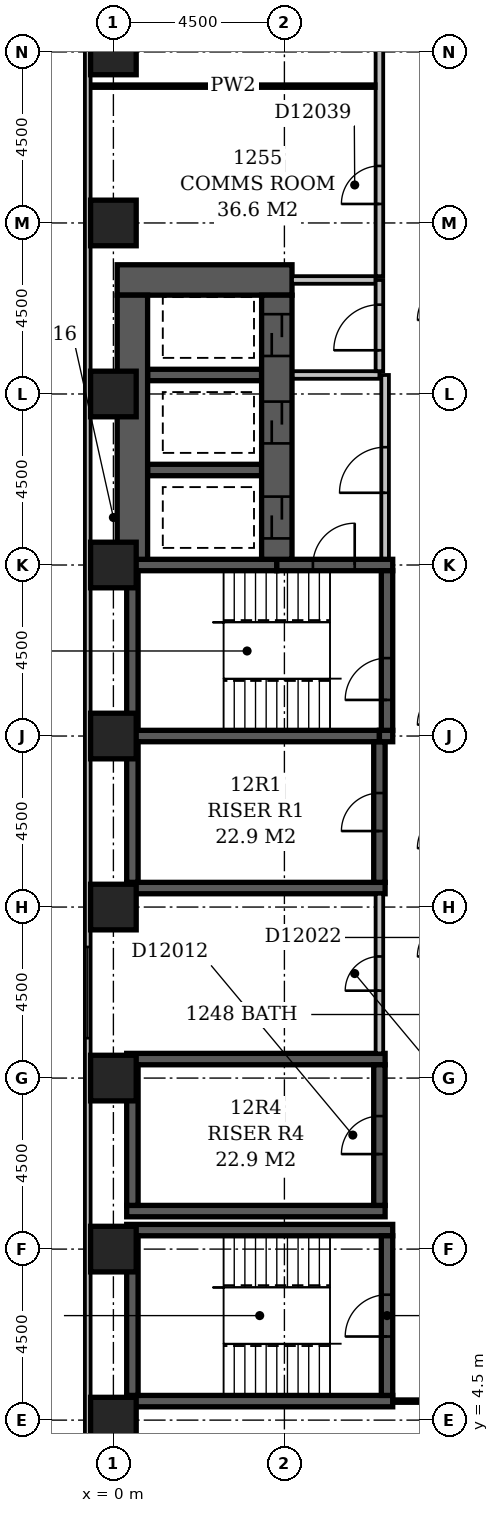
"""IFC4 building model, lengths in metres.
Left out: names, types, materials, properties, quantities, classifications, styles, units other than length and angle.
Written with IfcOpenShell. Run it as: python <this file> out.ifc"""

import sys

from ifc_helpers import new_model, si_unit, direction, frame, frame_2d, origin, origin_2d, place, context, subcontext, project, spatial, rectangle, extrude, element, fill, save


model = new_model("IFC4")
c1 = context("Model", 3, precision=1e-05, world=origin(), true_north=direction((0.0, 1.0)))
c2 = subcontext(c1, "Body", "Model", "MODEL_VIEW")
j1 = project(units=[si_unit("LENGTHUNIT", "METRE"), si_unit("PLANEANGLEUNIT", "RADIAN")], contexts=[c1])
p1 = place(None, origin())
s1 = spatial("IfcSite", under=j1, at=p1, CompositionType="ELEMENT")
p2 = place(p1, origin())
s2 = spatial("IfcBuilding", under=s1, at=p2, CompositionType="ELEMENT")
p3 = place(p2, frame((0.0, 0.0, 54.2)))
s3 = spatial("IfcBuildingStorey", under=s2, at=p3, CompositionType="ELEMENT", Elevation=54.2)
p4 = place(p3, frame((0.1, 34.5, -0.3), z_axis=(0.0, 0.0, 1.0), x_axis=(1.0, 0.0, 0.0)))
e1 = element("IfcWall", 1, at=p4, inside=s3, PredefinedType="SHEAR", context=c2, shape_type="SweptSolid", body=[
    extrude(rectangle(XDim=4.6, YDim=0.8, at=frame_2d((2.3, 0.0))), origin(), (0.0, 0.0, 1.0), 3.6),
])
for number, where, z_axis, x_axis in (
    (2, (0.35, 5.0, -0.3), (0.0, 0.0, 1.0), (1.0, 0.0, 0.0)),
    (3, (0.35, 9.5, -0.3), (0.0, 0.0, 1.0), (1.0, 0.0, 0.0)),
):
    element("IfcWall", number, at=place(p3, frame(where, z_axis=z_axis, x_axis=x_axis)), inside=s3, PredefinedType="SHEAR", context=c2, shape_type="SweptSolid", body=[
        extrude(rectangle(XDim=7.0, YDim=0.3, at=frame_2d((3.5, 0.0))), origin(), (0.0, 0.0, 1.0), 3.6),
    ])
for number, where, z_axis, x_axis in (
    (4, (0.35, 10.0, -0.3), (0.0, 0.0, 1.0), (1.0, 0.0, 0.0)),
    (5, (0.35, 14.0, -0.3), (0.0, 0.0, 1.0), (1.0, 0.0, 0.0)),
    (6, (0.35, 18.5, -0.3), (0.0, 0.0, 1.0), (1.0, 0.0, 0.0)),
):
    element("IfcWall", number, at=place(p3, frame(where, z_axis=z_axis, x_axis=x_axis)), inside=s3, PredefinedType="SHEAR", context=c2, shape_type="SweptSolid", body=[
        extrude(rectangle(XDim=6.8, YDim=0.3, at=frame_2d((3.4, 0.0))), origin(), (0.0, 0.0, 1.0), 3.6),
    ])
p5 = place(p3, frame((0.35, 22.5, -0.3), z_axis=(0.0, 0.0, 1.0), x_axis=(1.0, 0.0, 0.0)))
e7 = element("IfcWall", 7, at=p5, inside=s3, PredefinedType="SHEAR", context=c2, shape_type="SweptSolid", body=[
    extrude(rectangle(XDim=6.65, YDim=0.3, at=frame_2d((3.325, 0.0))), origin(), (0.0, 0.0, 1.0), 3.6),
])
p6 = place(p3, frame((0.35, 27.0, -0.3), z_axis=(0.0, 0.0, 1.0), x_axis=(1.0, 0.0, 0.0)))
e8 = element("IfcWall", 8, at=p6, inside=s3, PredefinedType="SHEAR", context=c2, shape_type="SweptSolid", body=[
    extrude(rectangle(XDim=3.95, YDim=0.3, at=frame_2d((1.975, 0.0))), origin(), (0.0, 0.0, 1.0), 3.6),
])
p7 = place(p3, frame((0.5, 5.15, -0.3), z_axis=(0.0, 0.0, 1.0), x_axis=(0.0, 1.0, 0.0)))
e9 = element("IfcWall", 9, at=p7, inside=s3, PredefinedType="SHEAR", context=c2, shape_type="SweptSolid", body=[
    extrude(rectangle(XDim=4.2, YDim=0.3, at=frame_2d((2.1, 0.0))), origin(), (0.0, 0.0, 1.0), 3.6),
])
for number, where, z_axis, x_axis in (
    (10, (0.5, 10.15, -0.3), (0.0, 0.0, 1.0), (0.0, 1.0, 0.0)),
    (11, (0.5, 18.65, -0.3), (0.0, 0.0, 1.0), (0.0, 1.0, 0.0)),
):
    element("IfcWall", number, at=place(p3, frame(where, z_axis=z_axis, x_axis=x_axis)), inside=s3, PredefinedType="SHEAR", context=c2, shape_type="SweptSolid", body=[
        extrude(rectangle(XDim=3.7, YDim=0.3, at=frame_2d((1.85, 0.0))), origin(), (0.0, 0.0, 1.0), 3.6),
    ])
p8 = place(p3, frame((0.5, 22.65, -0.3), z_axis=(0.0, 0.0, 1.0), x_axis=(0.0, 1.0, 0.0)))
e12 = element("IfcWall", 12, at=p8, inside=s3, PredefinedType="SHEAR", context=c2, shape_type="SweptSolid", body=[
    extrude(rectangle(XDim=4.2, YDim=0.3, at=frame_2d((2.1, 0.0))), origin(), (0.0, 0.0, 1.0), 3.6),
])
p9 = place(p3, frame((0.5, 27.15, -0.3), z_axis=(0.0, 0.0, 1.0), x_axis=(0.0, 1.0, 0.0)))
e13 = element("IfcWall", 13, at=p9, inside=s3, PredefinedType="SHEAR", context=c2, shape_type="SweptSolid", body=[
    extrude(rectangle(XDim=6.95, YDim=0.8, at=frame_2d((3.475, 0.0))), origin(), (0.0, 0.0, 1.0), 3.6),
])
for number, where, z_axis, x_axis in (
    (14, (0.9, 29.5, -0.3), (0.0, 0.0, 1.0), (1.0, 0.0, 0.0)),
    (15, (0.9, 32.0, -0.3), (0.0, 0.0, 1.0), (1.0, 0.0, 0.0)),
):
    element("IfcWall", number, at=place(p3, frame(where, z_axis=z_axis, x_axis=x_axis)), inside=s3, PredefinedType="SHEAR", context=c2, shape_type="SweptSolid", body=[
        extrude(rectangle(XDim=3.0, YDim=0.3, at=frame_2d((1.5, 0.0))), origin(), (0.0, 0.0, 1.0), 3.6),
    ])
p10 = place(p3, frame((4.3, 27.0, -0.3), z_axis=(0.0, 0.0, 1.0), x_axis=(1.0, 0.0, 0.0)))
e16 = element("IfcWall", 16, at=p10, inside=s3, PredefinedType="SHEAR", context=c2, shape_type="SweptSolid", body=[
    extrude(rectangle(XDim=3.05, YDim=0.3, at=frame_2d((1.525, 0.0))), origin(), (0.0, 0.0, 1.0), 3.6),
])
p11 = place(p10, frame((0.95, 0.0, 0.3)))
e17 = element("IfcOpeningElement", 17, at=p11, cuts=e16, PredefinedType="OPENING", context=c2, shape_type="SweptSolid", body=[
    extrude(rectangle(XDim=1.1, YDim=2.1, at=frame_2d((0.55, 1.05))), frame((0.0, 0.162, 0.0), z_axis=(0.0, -1.0, 0.0), x_axis=(1.0, 0.0, 0.0)), (0.0, 0.0, 1.0), 0.324),
])
p12 = place(p3, frame((4.3, 27.15, -0.3), z_axis=(0.0, 0.0, 1.0), x_axis=(0.0, 1.0, 0.0)))
e18 = element("IfcWall", 18, at=p12, inside=s3, PredefinedType="SHEAR", context=c2, shape_type="SweptSolid", body=[
    extrude(rectangle(XDim=6.95, YDim=0.8, at=frame_2d((3.475, 0.0))), origin(), (0.0, 0.0, 1.0), 3.6),
])
p13 = place(p12, frame((3.05, 0.0, 0.3)))
e19 = element("IfcOpeningElement", 19, at=p13, cuts=e18, PredefinedType="OPENING", context=c2, shape_type="SweptSolid", body=[
    extrude(rectangle(XDim=1.1, YDim=2.1, at=frame_2d((0.55, 1.05))), frame((0.0, 0.412, 0.0), z_axis=(0.0, -1.0, 0.0), x_axis=(1.0, 0.0, 0.0)), (0.0, 0.0, 1.0), 0.824),
])
p14 = place(p12, frame((0.55, 0.0, 0.3)))
e20 = element("IfcOpeningElement", 20, at=p14, cuts=e18, PredefinedType="OPENING", context=c2, shape_type="SweptSolid", body=[
    extrude(rectangle(XDim=1.1, YDim=2.1, at=frame_2d((0.55, 1.05))), frame((0.0, 0.412, 0.0), z_axis=(0.0, -1.0, 0.0), x_axis=(1.0, 0.0, 0.0)), (0.0, 0.0, 1.0), 0.824),
])
p15 = place(p12, frame((5.35, 0.0, 0.3)))
e21 = element("IfcOpeningElement", 21, at=p15, cuts=e18, PredefinedType="OPENING", context=c2, shape_type="SweptSolid", body=[
    extrude(rectangle(XDim=1.1, YDim=2.1, at=frame_2d((0.55, 1.05))), frame((0.0, 0.412, 0.0), z_axis=(0.0, -1.0, 0.0), x_axis=(1.0, 0.0, 0.0)), (0.0, 0.0, 1.0), 0.824),
])
p16 = place(p3, frame((7.0, 10.15, -0.3), z_axis=(0.0, 0.0, 1.0), x_axis=(0.0, 1.0, 0.0)))
e22 = element("IfcWall", 22, at=p16, inside=s3, PredefinedType="SHEAR", context=c2, shape_type="SweptSolid", body=[
    extrude(rectangle(XDim=3.7, YDim=0.3, at=frame_2d((1.85, 0.0))), origin(), (0.0, 0.0, 1.0), 3.6),
])
p17 = place(p16, frame((1.35, 0.0, 0.3)))
e23 = element("IfcOpeningElement", 23, at=p17, cuts=e22, PredefinedType="OPENING", context=c2, shape_type="SweptSolid", body=[
    extrude(rectangle(XDim=1.0, YDim=2.1, at=frame_2d((0.5, 1.05))), frame((0.0, 0.162, 0.0), z_axis=(0.0, -1.0, 0.0), x_axis=(1.0, 0.0, 0.0)), (0.0, 0.0, 1.0), 0.324),
])
p18 = place(p3, frame((7.0, 18.65, -0.3), z_axis=(0.0, 0.0, 1.0), x_axis=(0.0, 1.0, 0.0)))
e24 = element("IfcWall", 24, at=p18, inside=s3, PredefinedType="SHEAR", context=c2, shape_type="SweptSolid", body=[
    extrude(rectangle(XDim=3.7, YDim=0.3, at=frame_2d((1.85, 0.0))), origin(), (0.0, 0.0, 1.0), 3.6),
])
p19 = place(p18, frame((1.35, 0.0, 0.3)))
e25 = element("IfcOpeningElement", 25, at=p19, cuts=e24, PredefinedType="OPENING", context=c2, shape_type="SweptSolid", body=[
    extrude(rectangle(XDim=1.0, YDim=2.1, at=frame_2d((0.5, 1.05))), frame((0.0, 0.162, 0.0), z_axis=(0.0, -1.0, 0.0), x_axis=(1.0, 0.0, 0.0)), (0.0, 0.0, 1.0), 0.324),
])
p20 = place(p3, frame((7.0, 22.5, -0.3), z_axis=(0.0, 0.0, 1.0), x_axis=(1.0, 0.0, 0.0)))
e26 = element("IfcWall", 26, at=p20, inside=s3, PredefinedType="SHEAR", context=c2, shape_type="SweptSolid", body=[
    extrude(rectangle(XDim=0.35, YDim=0.3, at=frame_2d((0.175, 0.0))), origin(), (0.0, 0.0, 1.0), 3.6),
])
p21 = place(p3, frame((7.2, 5.15, -0.3), z_axis=(0.0, 0.0, 1.0), x_axis=(0.0, 1.0, 0.0)))
e27 = element("IfcWall", 27, at=p21, inside=s3, PredefinedType="SHEAR", context=c2, shape_type="SweptSolid", body=[
    extrude(rectangle(XDim=4.2, YDim=0.3, at=frame_2d((2.1, 0.0))), origin(), (0.0, 0.0, 1.0), 3.6),
])
p22 = place(p21, frame((1.55, 0.0, 0.3)))
e28 = element("IfcOpeningElement", 28, at=p22, cuts=e27, PredefinedType="OPENING", context=c2, shape_type="SweptSolid", body=[
    extrude(rectangle(XDim=1.1, YDim=2.1, at=frame_2d((0.55, 1.05))), frame((0.0, 0.162, 0.0), z_axis=(0.0, -1.0, 0.0), x_axis=(1.0, 0.0, 0.0)), (0.0, 0.0, 1.0), 0.324),
])
p23 = place(p3, frame((7.2, 22.65, -0.3), z_axis=(0.0, 0.0, 1.0), x_axis=(0.0, 1.0, 0.0)))
e29 = element("IfcWall", 29, at=p23, inside=s3, PredefinedType="SHEAR", context=c2, shape_type="SweptSolid", body=[
    extrude(rectangle(XDim=4.2, YDim=0.3, at=frame_2d((2.1, 0.0))), origin(), (0.0, 0.0, 1.0), 3.6),
])
p24 = place(p23, frame((0.8, 0.0, 0.3)))
e30 = element("IfcOpeningElement", 30, at=p24, cuts=e29, PredefinedType="OPENING", context=c2, shape_type="SweptSolid", body=[
    extrude(rectangle(XDim=1.1, YDim=2.1, at=frame_2d((0.55, 1.05))), frame((0.0, 0.162, 0.0), z_axis=(0.0, -1.0, 0.0), x_axis=(1.0, 0.0, 0.0)), (0.0, 0.0, 1.0), 0.324),
])
for number, where, z_axis, x_axis in (
    (31, (0.0, 4.5, -0.3), (0.0, 0.0, 1.0), (1.0, 0.0, 0.0)),
    (32, (0.0, 9.0, -0.3), (0.0, 0.0, 1.0), (1.0, 0.0, 0.0)),
    (33, (0.0, 13.5, -0.3), (0.0, 0.0, 1.0), (1.0, 0.0, 0.0)),
    (34, (0.0, 18.0, -0.3), (0.0, 0.0, 1.0), (1.0, 0.0, 0.0)),
    (35, (0.0, 22.5, -0.3), (0.0, 0.0, 1.0), (1.0, 0.0, 0.0)),
    (36, (0.0, 27.0, -0.3), (0.0, 0.0, 1.0), (1.0, 0.0, 0.0)),
    (37, (0.0, 31.5, -0.3), (0.0, 0.0, 1.0), (1.0, 0.0, 0.0)),
    (38, (0.0, 36.0, -0.3), (0.0, 0.0, 1.0), (1.0, 0.0, 0.0)),
    (39, (0.0, 40.5, -0.3), (0.0, 0.0, 1.0), (1.0, 0.0, 0.0)),
):
    element("IfcColumn", number, at=place(p3, frame(where, z_axis=z_axis, x_axis=x_axis)), inside=s3, PredefinedType="COLUMN", context=c2, shape_type="SweptSolid", body=[
        extrude(rectangle(XDim=1.2, YDim=1.2, at=origin_2d()), origin(), (0.0, 0.0, 1.0), 3.6),
    ])
p25 = place(p3, frame((-0.675, 59.1, 0.0), z_axis=(0.0, 0.0, 1.0), x_axis=(0.0, -1.0, 0.0)))
e40 = element("IfcWall", 40, at=p25, inside=s3, PredefinedType="STANDARD", context=c2, shape_type="SweptSolid", body=[
    extrude(rectangle(XDim=55.35, YDim=0.15, at=frame_2d((27.675, 0.0))), origin(), (0.0, 0.0, 1.0), 2.7),
])
p26 = place(p25, frame((10.65, 0.0, 0.6)))
e41 = element("IfcOpeningElement", 41, at=p26, cuts=e40, PredefinedType="OPENING", context=c2, shape_type="SweptSolid", body=[
    extrude(rectangle(XDim=2.4, YDim=1.8, at=frame_2d((1.2, 0.9))), frame((0.0, 0.087, 0.0), z_axis=(0.0, -1.0, 0.0), x_axis=(1.0, 0.0, 0.0)), (0.0, 0.0, 1.0), 0.174),
])
p27 = place(p25, frame((42.15, 0.0, 0.6)))
e42 = element("IfcOpeningElement", 42, at=p27, cuts=e40, PredefinedType="OPENING", context=c2, shape_type="SweptSolid", body=[
    extrude(rectangle(XDim=2.4, YDim=1.8, at=frame_2d((1.2, 0.9))), frame((0.0, 0.087, 0.0), z_axis=(0.0, -1.0, 0.0), x_axis=(1.0, 0.0, 0.0)), (0.0, 0.0, 1.0), 0.174),
])
p28 = place(p3, frame((4.72, 32.0, 0.0), z_axis=(0.0, 0.0, 1.0), x_axis=(1.0, 0.0, 0.0)))
e43 = element("IfcWall", 43, at=p28, inside=s3, PredefinedType="PARTITIONING", context=c2, shape_type="SweptSolid", body=[
    extrude(rectangle(XDim=2.28, YDim=0.2, at=frame_2d((1.14, 0.0))), origin(), (0.0, 0.0, 1.0), 3.3),
])
p29 = place(p3, frame((7.0, 32.1, 0.0), z_axis=(0.0, 0.0, 1.0), x_axis=(0.0, 1.0, 0.0)))
e44 = element("IfcWall", 44, at=p29, inside=s3, PredefinedType="PARTITIONING", context=c2, shape_type="SweptSolid", body=[
    extrude(rectangle(XDim=2.4, YDim=0.2, at=frame_2d((1.2, 0.0))), origin(), (0.0, 0.0, 1.0), 3.3),
])
p30 = place(p29, frame((0.55, 0.0, 0.0)))
e45 = element("IfcOpeningElement", 45, at=p30, cuts=e44, PredefinedType="OPENING", context=c2, shape_type="SweptSolid", body=[
    extrude(rectangle(XDim=1.2, YDim=2.1, at=frame_2d((0.6, 1.05))), frame((0.0, 0.112, 0.0), z_axis=(0.0, -1.0, 0.0), x_axis=(1.0, 0.0, 0.0)), (0.0, 0.0, 1.0), 0.224),
])
p31 = place(p3, frame((4.7, 34.5, 0.0), z_axis=(0.0, 0.0, 1.0), x_axis=(1.0, 0.0, 0.0)))
e46 = element("IfcWall", 46, at=p31, inside=s3, PredefinedType="PARTITIONING", context=c2, shape_type="SweptSolid", body=[
    extrude(rectangle(XDim=2.2, YDim=0.2, at=frame_2d((1.1, 0.0))), origin(), (0.0, 0.0, 1.0), 3.3),
])
p32 = place(p3, frame((7.15, 27.17, 0.0), z_axis=(0.0, 0.0, 1.0), x_axis=(0.0, 1.0, 0.0)))
e47 = element("IfcWall", 47, at=p32, inside=s3, PredefinedType="PARTITIONING", context=c2, shape_type="SweptSolid", body=[
    extrude(rectangle(XDim=4.83, YDim=0.2, at=frame_2d((2.415, 0.0))), origin(), (0.0, 0.0, 1.0), 3.3),
])
p33 = place(p32, frame((1.73, 0.0, 0.0)))
e48 = element("IfcOpeningElement", 48, at=p33, cuts=e47, PredefinedType="OPENING", context=c2, shape_type="SweptSolid", body=[
    extrude(rectangle(XDim=1.2, YDim=2.1, at=frame_2d((0.6, 1.05))), frame((0.0, 0.112, 0.0), z_axis=(0.0, -1.0, 0.0), x_axis=(1.0, 0.0, 0.0)), (0.0, 0.0, 1.0), 0.224),
])
p34 = place(p3, frame((0.0, 4.4, 0.0), z_axis=(0.0, 0.0, 1.0), x_axis=(0.0, 1.0, 0.0)))
e49 = element("IfcWall", 49, at=p34, inside=s3, PredefinedType="PARTITIONING", context=c2, shape_type="SweptSolid", body=[
    extrude(rectangle(XDim=0.7, YDim=0.1, at=frame_2d((0.35, 0.0))), origin(), (0.0, 0.0, 1.0), 2.7),
])
p35 = place(p3, frame((7.349, 5.0, 0.0), z_axis=(0.0, 0.0, 1.0), x_axis=(1.0, 0.0, 0.0)))
e50 = element("IfcWall", 50, at=p35, inside=s3, PredefinedType="PARTITIONING", context=c2, shape_type="SweptSolid", body=[
    extrude(rectangle(XDim=1.551, YDim=0.1, at=frame_2d((0.775, 0.0))), origin(), (0.0, 0.0, 1.0), 3.3),
])
p36 = place(p3, frame((7.0, 14.15, 0.0), z_axis=(0.0, 0.0, 1.0), x_axis=(0.0, 1.0, 0.0)))
e51 = element("IfcWall", 51, at=p36, inside=s3, PredefinedType="PARTITIONING", context=c2, shape_type="SweptSolid", body=[
    extrude(rectangle(XDim=4.2, YDim=0.2, at=frame_2d((2.1, 0.0))), origin(), (0.0, 0.0, 1.0), 3.3),
])
p37 = place(p36, frame((1.65, 0.0, 0.0)))
e52 = element("IfcOpeningElement", 52, at=p37, cuts=e51, PredefinedType="OPENING", context=c2, shape_type="SweptSolid", body=[
    extrude(rectangle(XDim=0.9, YDim=2.1, at=frame_2d((0.45, 1.05))), frame((0.0, 0.112, 0.0), z_axis=(0.0, -1.0, 0.0), x_axis=(1.0, 0.0, 0.0)), (0.0, 0.0, 1.0), 0.224),
])
p38 = place(p3, frame((7.0, 34.6, 0.0), z_axis=(0.0, 0.0, 1.0), x_axis=(0.0, 1.0, 0.0)))
e53 = element("IfcWall", 53, at=p38, inside=s3, PredefinedType="PARTITIONING", context=c2, shape_type="SweptSolid", body=[
    extrude(rectangle(XDim=14.8, YDim=0.2, at=frame_2d((7.4, 0.0))), origin(), (0.0, 0.0, 1.0), 3.3),
])
p39 = place(p38, frame((1.9, 0.0, 0.0)))
e54 = element("IfcOpeningElement", 54, at=p39, cuts=e53, PredefinedType="OPENING", context=c2, shape_type="SweptSolid", body=[
    extrude(rectangle(XDim=1.0, YDim=2.1, at=frame_2d((0.5, 1.05))), frame((0.0, 0.112, 0.0), z_axis=(0.0, -1.0, 0.0), x_axis=(1.0, 0.0, 0.0)), (0.0, 0.0, 1.0), 0.224),
])
p40 = place(p38, frame((6.9, 0.0, 0.0)))
e55 = element("IfcOpeningElement", 55, at=p40, cuts=e53, PredefinedType="OPENING", context=c2, shape_type="SweptSolid", body=[
    extrude(rectangle(XDim=1.0, YDim=2.1, at=frame_2d((0.5, 1.05))), frame((0.0, 0.112, 0.0), z_axis=(0.0, -1.0, 0.0), x_axis=(1.0, 0.0, 0.0)), (0.0, 0.0, 1.0), 0.224),
])
p41 = place(p38, frame((11.95, 0.0, 0.0)))
e56 = element("IfcOpeningElement", 56, at=p41, cuts=e53, PredefinedType="OPENING", context=c2, shape_type="SweptSolid", body=[
    extrude(rectangle(XDim=0.9, YDim=2.1, at=frame_2d((0.45, 1.05))), frame((0.0, 0.112, 0.0), z_axis=(0.0, -1.0, 0.0), x_axis=(1.0, 0.0, 0.0)), (0.0, 0.0, 1.0), 0.224),
])
p42 = place(p3, frame((-0.6, 39.6, 0.0), z_axis=(0.0, 0.0, 1.0), x_axis=(1.0, 0.0, 0.0)))
e57 = element("IfcWall", 57, at=p42, inside=s3, PredefinedType="PARTITIONING", context=c2, shape_type="SweptSolid", body=[
    extrude(rectangle(XDim=7.5, YDim=0.1, at=frame_2d((3.75, 0.0))), origin(), (0.0, 0.0, 1.0), 3.3),
])
p43 = place(p27, origin())
e58 = element("IfcWindow", 58, at=p43, inside=s3, PartitioningType="SINGLE_PANEL", PredefinedType="WINDOW", context=c2, shape_type="SweptSolid", body=[
    extrude(rectangle(XDim=2.4, YDim=1.8, at=frame_2d((1.2, 0.9))), frame((0.0, 0.03, 0.0), z_axis=(0.0, -1.0, 0.0), x_axis=(1.0, 0.0, 0.0)), (0.0, 0.0, 1.0), 0.06),
])
fill(e42, e58)
p44 = place(p33, origin())
e59 = element("IfcDoor", 59, at=p44, inside=s3, OperationType="SINGLE_SWING_LEFT", PredefinedType="DOOR", context=c2, shape_type="SweptSolid", body=[
    extrude(rectangle(XDim=1.2, YDim=2.1, at=frame_2d((0.6, 1.05))), frame((0.0, 0.025, 0.0), z_axis=(0.0, -1.0, 0.0), x_axis=(1.0, 0.0, 0.0)), (0.0, 0.0, 1.0), 0.05),
])
fill(e48, e59)
p45 = place(p13, origin())
e60 = element("IfcDoor", 60, at=p45, inside=s3, OperationType="SLIDING_TO_LEFT", PredefinedType="DOOR", context=c2, shape_type="SweptSolid", body=[
    extrude(rectangle(XDim=1.1, YDim=2.1, at=frame_2d((0.55, 1.05))), frame((0.0, 0.025, 0.0), z_axis=(0.0, -1.0, 0.0), x_axis=(1.0, 0.0, 0.0)), (0.0, 0.0, 1.0), 0.05),
])
fill(e19, e60)
p46 = place(p14, origin())
e61 = element("IfcDoor", 61, at=p46, inside=s3, OperationType="SLIDING_TO_LEFT", PredefinedType="DOOR", context=c2, shape_type="SweptSolid", body=[
    extrude(rectangle(XDim=1.1, YDim=2.1, at=frame_2d((0.55, 1.05))), frame((0.0, 0.025, 0.0), z_axis=(0.0, -1.0, 0.0), x_axis=(1.0, 0.0, 0.0)), (0.0, 0.0, 1.0), 0.05),
])
fill(e20, e61)
p47 = place(p30, origin())
e62 = element("IfcDoor", 62, at=p47, inside=s3, OperationType="SINGLE_SWING_LEFT", PredefinedType="DOOR", context=c2, shape_type="SweptSolid", body=[
    extrude(rectangle(XDim=1.2, YDim=2.1, at=frame_2d((0.6, 1.05))), frame((0.0, 0.025, 0.0), z_axis=(0.0, -1.0, 0.0), x_axis=(1.0, 0.0, 0.0)), (0.0, 0.0, 1.0), 0.05),
])
fill(e45, e62)
p48 = place(p15, origin())
e63 = element("IfcDoor", 63, at=p48, inside=s3, OperationType="SLIDING_TO_LEFT", PredefinedType="DOOR", context=c2, shape_type="SweptSolid", body=[
    extrude(rectangle(XDim=1.1, YDim=2.1, at=frame_2d((0.55, 1.05))), frame((0.0, 0.025, 0.0), z_axis=(0.0, -1.0, 0.0), x_axis=(1.0, 0.0, 0.0)), (0.0, 0.0, 1.0), 0.05),
])
fill(e21, e63)
p49 = place(p19, origin())
e64 = element("IfcDoor", 64, at=p49, inside=s3, OperationType="SINGLE_SWING_LEFT", PredefinedType="DOOR", context=c2, shape_type="SweptSolid", body=[
    extrude(rectangle(XDim=1.0, YDim=2.1, at=frame_2d((0.5, 1.05))), frame((0.0, 0.025, 0.0), z_axis=(0.0, -1.0, 0.0), x_axis=(1.0, 0.0, 0.0)), (0.0, 0.0, 1.0), 0.05),
])
fill(e25, e64)
p50 = place(p17, origin())
e65 = element("IfcDoor", 65, at=p50, inside=s3, OperationType="SINGLE_SWING_LEFT", PredefinedType="DOOR", context=c2, shape_type="SweptSolid", body=[
    extrude(rectangle(XDim=1.0, YDim=2.1, at=frame_2d((0.5, 1.05))), frame((0.0, 0.025, 0.0), z_axis=(0.0, -1.0, 0.0), x_axis=(1.0, 0.0, 0.0)), (0.0, 0.0, 1.0), 0.05),
])
fill(e23, e65)
p51 = place(p11, frame((1.1, 0.0, 0.0), z_axis=(0.0, 0.0, 1.0), x_axis=(-1.0, 0.0, 0.0)))
e66 = element("IfcDoor", 66, at=p51, inside=s3, OperationType="SINGLE_SWING_LEFT", PredefinedType="DOOR", context=c2, shape_type="SweptSolid", body=[
    extrude(rectangle(XDim=1.1, YDim=2.1, at=frame_2d((0.55, 1.05))), frame((0.0, 0.025, 0.0), z_axis=(0.0, -1.0, 0.0), x_axis=(1.0, 0.0, 0.0)), (0.0, 0.0, 1.0), 0.05),
])
fill(e17, e66)
p52 = place(p24, origin())
e67 = element("IfcDoor", 67, at=p52, inside=s3, OperationType="SINGLE_SWING_LEFT", PredefinedType="DOOR", context=c2, shape_type="SweptSolid", body=[
    extrude(rectangle(XDim=1.1, YDim=2.1, at=frame_2d((0.55, 1.05))), frame((0.0, 0.025, 0.0), z_axis=(0.0, -1.0, 0.0), x_axis=(1.0, 0.0, 0.0)), (0.0, 0.0, 1.0), 0.05),
])
fill(e30, e67)
p53 = place(p22, origin())
e68 = element("IfcDoor", 68, at=p53, inside=s3, OperationType="SINGLE_SWING_LEFT", PredefinedType="DOOR", context=c2, shape_type="SweptSolid", body=[
    extrude(rectangle(XDim=1.1, YDim=2.1, at=frame_2d((0.55, 1.05))), frame((0.0, 0.025, 0.0), z_axis=(0.0, -1.0, 0.0), x_axis=(1.0, 0.0, 0.0)), (0.0, 0.0, 1.0), 0.05),
])
fill(e28, e68)
p54 = place(p37, origin())
e69 = element("IfcDoor", 69, at=p54, inside=s3, OperationType="SINGLE_SWING_LEFT", PredefinedType="DOOR", context=c2, shape_type="SweptSolid", body=[
    extrude(rectangle(XDim=0.9, YDim=2.1, at=frame_2d((0.45, 1.05))), frame((0.0, 0.025, 0.0), z_axis=(0.0, -1.0, 0.0), x_axis=(1.0, 0.0, 0.0)), (0.0, 0.0, 1.0), 0.05),
])
fill(e52, e69)
p55 = place(p39, origin())
e70 = element("IfcDoor", 70, at=p55, inside=s3, OperationType="SINGLE_SWING_LEFT", PredefinedType="DOOR", context=c2, shape_type="SweptSolid", body=[
    extrude(rectangle(XDim=1.0, YDim=2.1, at=frame_2d((0.5, 1.05))), frame((0.0, 0.025, 0.0), z_axis=(0.0, -1.0, 0.0), x_axis=(1.0, 0.0, 0.0)), (0.0, 0.0, 1.0), 0.05),
])
fill(e54, e70)
save(model, sys.argv[1])
